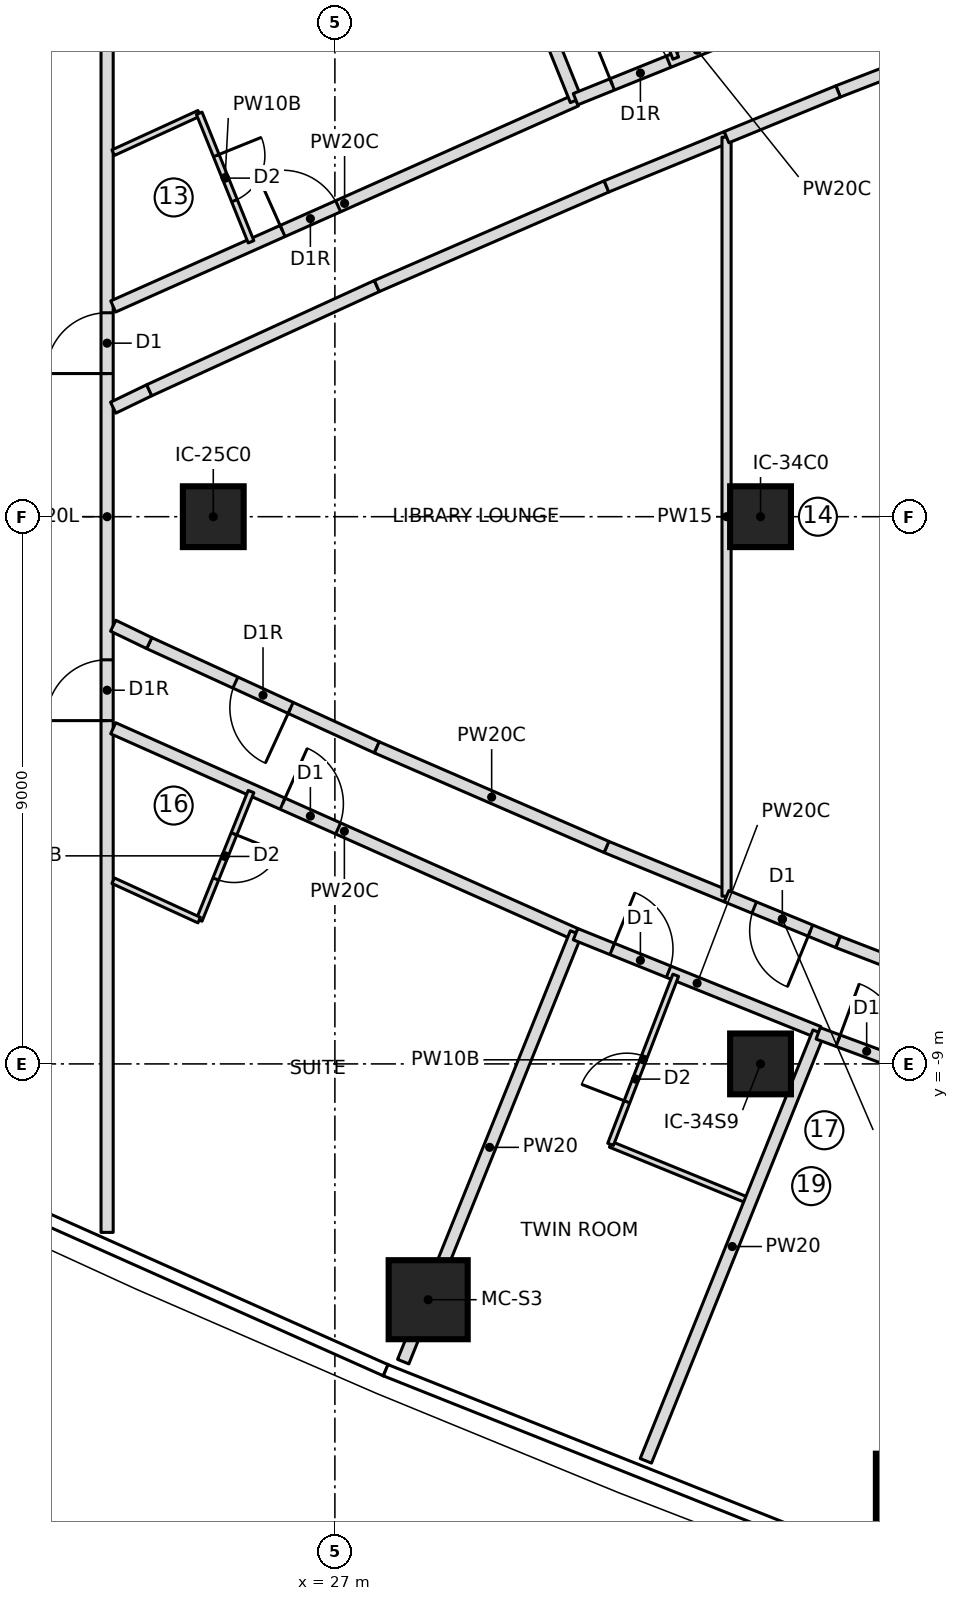
"""IFC4 building model, lengths in metres.
Left out: names, types, materials, properties, quantities, classifications, styles, units other than length and angle.
Written with IfcOpenShell. Run it as: python <this file> out.ifc"""

import sys

from ifc_helpers import new_model, si_unit, direction, frame, frame_2d, origin, origin_2d, place, context, subcontext, project, spatial, rectangle, extrude, element, fill, save


model = new_model("IFC4")
c1 = context("Model", 3, precision=1e-05, world=origin(), true_north=direction((0.0, 1.0)))
c2 = subcontext(c1, "Body", "Model", "MODEL_VIEW")
j1 = project(units=[si_unit("LENGTHUNIT", "METRE"), si_unit("PLANEANGLEUNIT", "RADIAN")], contexts=[c1])
p1 = place(None, origin())
s1 = spatial("IfcSite", under=j1, at=p1, CompositionType="ELEMENT")
p2 = place(p1, origin())
s2 = spatial("IfcBuilding", under=s1, at=p2, CompositionType="ELEMENT")
p3 = place(p2, frame((0.0, 0.0, 203.9)))
s3 = spatial("IfcBuildingStorey", under=s2, at=p3, CompositionType="ELEMENT", Elevation=203.9)
for number, where, z_axis, x_axis in (
    (1, (28.534, -12.878, 0.0), (0.0, 0.0, 1.0), (1.0, 0.0, 0.0)),
    (2, (36.547, -16.061, 0.0), (0.0, 0.0, 1.0), (1.0, 0.0, 0.0)),
):
    element("IfcColumn", number, at=place(p3, frame(where, z_axis=z_axis, x_axis=x_axis)), inside=s3, PredefinedType="COLUMN", context=c2, shape_type="SweptSolid", body=[
        extrude(rectangle(XDim=1.3, YDim=1.3, at=origin_2d()), origin(), (0.0, 0.0, 1.0), 3.55),
    ])
for number, where, z_axis, x_axis in (
    (3, (25.0, 0.0, 0.0), (0.0, 0.0, 1.0), (1.0, 0.0, 0.0)),
    (4, (34.0, -9.0, 0.0), (0.0, 0.0, 1.0), (1.0, 0.0, 0.0)),
    (5, (34.0, 0.0, 0.0), (0.0, 0.0, 1.0), (1.0, 0.0, 0.0)),
):
    element("IfcColumn", number, at=place(p3, frame(where, z_axis=z_axis, x_axis=x_axis)), inside=s3, PredefinedType="COLUMN", context=c2, shape_type="SweptSolid", body=[
        extrude(rectangle(XDim=1.0, YDim=1.0, at=origin_2d()), origin(), (0.0, 0.0, 1.0), 3.55),
    ])
p4 = place(p3, frame((23.254, -11.771, 0.0), z_axis=(0.0, 0.0, 1.0), x_axis=(0.0, 1.0, 0.0)))
e6 = element("IfcWall", 6, at=p4, inside=s3, PredefinedType="PARTITIONING", context=c2, shape_type="SweptSolid", body=[
    extrude(rectangle(XDim=23.542, YDim=0.2, at=frame_2d((11.771, 0.0))), origin(), (0.0, 0.0, 1.0), 3.25),
])
p5 = place(p4, frame((14.125, 0.0, 0.0)))
e7 = element("IfcOpeningElement", 7, at=p5, cuts=e6, PredefinedType="OPENING", context=c2, shape_type="SweptSolid", body=[
    extrude(rectangle(XDim=1.0, YDim=2.1, at=frame_2d((0.5, 1.05))), frame((0.0, 0.11, 0.0), z_axis=(0.0, -1.0, 0.0), x_axis=(1.0, 0.0, 0.0)), (0.0, 0.0, 1.0), 0.22),
])
p6 = place(p4, frame((8.417, 0.0, 0.0)))
e8 = element("IfcOpeningElement", 8, at=p6, cuts=e6, PredefinedType="OPENING", context=c2, shape_type="SweptSolid", body=[
    extrude(rectangle(XDim=1.0, YDim=2.1, at=frame_2d((0.5, 1.05))), frame((0.0, 0.11, 0.0), z_axis=(0.0, -1.0, 0.0), x_axis=(1.0, 0.0, 0.0)), (0.0, 0.0, 1.0), 0.22),
])
p7 = place(p3, frame((23.354, 3.458, 0.0), z_axis=(0.0, 0.0, 1.0), x_axis=(0.913485016927, 0.406872368009, 0.0)))
e9 = element("IfcWall", 9, at=p7, inside=s3, PredefinedType="PARTITIONING", context=c2, shape_type="SweptSolid", body=[
    extrude(rectangle(XDim=8.332, YDim=0.2, at=frame_2d((4.166, 0.0))), origin(), (0.0, 0.0, 1.0), 3.25),
])
p8 = place(p7, frame((3.05, 0.0, 0.0)))
e10 = element("IfcOpeningElement", 10, at=p8, cuts=e9, PredefinedType="OPENING", context=c2, shape_type="SweptSolid", body=[
    extrude(rectangle(XDim=1.0, YDim=2.1, at=frame_2d((0.5, 1.05))), frame((0.0, 0.11, 0.0), z_axis=(0.0, -1.0, 0.0), x_axis=(1.0, 0.0, 0.0)), (0.0, 0.0, 1.0), 0.22),
])
p9 = place(p3, frame((23.354, 5.987, 0.0), z_axis=(0.0, 0.0, 1.0), x_axis=(0.909158902999, 0.416449383597, 0.0)))
e11 = element("IfcWall", 11, at=p9, inside=s3, PredefinedType="PARTITIONING", context=c2, shape_type="SweptSolid", body=[
    extrude(rectangle(XDim=1.556, YDim=0.1, at=frame_2d((0.778, 0.0))), origin(), (0.0, 0.0, 1.0), 3.25),
])
p10 = place(p3, frame((24.769, 6.635, 0.0), z_axis=(0.0, 0.0, 1.0), x_axis=(0.373956446544, -0.927446265877, 0.0)))
e12 = element("IfcWall", 12, at=p10, inside=s3, PredefinedType="PARTITIONING", context=c2, shape_type="SweptSolid", body=[
    extrude(rectangle(XDim=2.279, YDim=0.1, at=frame_2d((1.14, 0.0))), origin(), (0.0, 0.0, 1.0), 3.25),
])
p11 = place(p10, frame((0.75, 0.0, 0.0)))
e13 = element("IfcOpeningElement", 13, at=p11, cuts=e12, PredefinedType="OPENING", context=c2, shape_type="SweptSolid", body=[
    extrude(rectangle(XDim=0.8, YDim=2.1, at=frame_2d((0.4, 1.05))), frame((0.0, 0.06, 0.0), z_axis=(0.0, -1.0, 0.0), x_axis=(1.0, 0.0, 0.0)), (0.0, 0.0, 1.0), 0.12),
])
p12 = place(p3, frame((30.965, 6.848, 0.0), z_axis=(0.0, 0.0, 1.0), x_axis=(-0.373876084216, 0.927478664796, 0.0)))
e14 = element("IfcWall", 14, at=p12, inside=s3, PredefinedType="PARTITIONING", context=c2, shape_type="SweptSolid", body=[
    extrude(rectangle(XDim=7.6, YDim=0.2, at=frame_2d((3.8, 0.0))), origin(), (0.0, 0.0, 1.0), 3.25),
])
p13 = place(p3, frame((30.958, 6.866, 0.0), z_axis=(0.0, 0.0, 1.0), x_axis=(0.927398695046, 0.374074404933, 0.0)))
e15 = element("IfcWall", 15, at=p13, inside=s3, PredefinedType="PARTITIONING", context=c2, shape_type="SweptSolid", body=[
    extrude(rectangle(XDim=4.311, YDim=0.2, at=frame_2d((2.155, 0.0))), origin(), (0.0, 0.0, 1.0), 3.25),
])
p14 = place(p13, frame((0.65, 0.0, 0.0)))
e16 = element("IfcOpeningElement", 16, at=p14, cuts=e15, PredefinedType="OPENING", context=c2, shape_type="SweptSolid", body=[
    extrude(rectangle(XDim=1.0, YDim=2.1, at=frame_2d((0.5, 1.05))), frame((0.0, 0.11, 0.0), z_axis=(0.0, -1.0, 0.0), x_axis=(1.0, 0.0, 0.0)), (0.0, 0.0, 1.0), 0.22),
])
p15 = place(p3, frame((32.605, 7.542, 0.0), z_axis=(0.0, 0.0, 1.0), x_axis=(-0.359637744424, 0.933092006603, 0.0)))
e17 = element("IfcWall", 17, at=p15, inside=s3, PredefinedType="PARTITIONING", context=c2, shape_type="SweptSolid", body=[
    extrude(rectangle(XDim=2.98, YDim=0.1, at=frame_2d((1.49, 0.0))), origin(), (0.0, 0.0, 1.0), 3.25),
])
p16 = place(p15, frame((1.45, 0.0, 0.0)))
e18 = element("IfcOpeningElement", 18, at=p16, cuts=e17, PredefinedType="OPENING", context=c2, shape_type="SweptSolid", body=[
    extrude(rectangle(XDim=0.8, YDim=2.1, at=frame_2d((0.4, 1.05))), frame((0.0, 0.06, 0.0), z_axis=(0.0, -1.0, 0.0), x_axis=(1.0, 0.0, 0.0)), (0.0, 0.0, 1.0), 0.12),
])
p17 = place(p3, frame((23.354, -3.479, 0.0), z_axis=(0.0, 0.0, 1.0), x_axis=(0.913491969365, -0.406856758461, 0.0)))
e19 = element("IfcWall", 19, at=p17, inside=s3, PredefinedType="PARTITIONING", context=c2, shape_type="SweptSolid", body=[
    extrude(rectangle(XDim=8.324, YDim=0.2, at=frame_2d((4.162, 0.0))), origin(), (0.0, 0.0, 1.0), 3.25),
])
p18 = place(p17, frame((3.05, 0.0, 0.0)))
e20 = element("IfcOpeningElement", 20, at=p18, cuts=e19, PredefinedType="OPENING", context=c2, shape_type="SweptSolid", body=[
    extrude(rectangle(XDim=1.0, YDim=2.1, at=frame_2d((0.5, 1.05))), frame((0.0, 0.11, 0.0), z_axis=(0.0, -1.0, 0.0), x_axis=(1.0, 0.0, 0.0)), (0.0, 0.0, 1.0), 0.22),
])
p19 = place(p3, frame((25.621, -4.521, 0.0), z_axis=(0.0, 0.0, 1.0), x_axis=(-0.373956446544, -0.927446265877, 0.0)))
e21 = element("IfcWall", 21, at=p19, inside=s3, PredefinedType="PARTITIONING", context=c2, shape_type="SweptSolid", body=[
    extrude(rectangle(XDim=2.279, YDim=0.1, at=frame_2d((1.14, 0.0))), origin(), (0.0, 0.0, 1.0), 3.25),
])
p20 = place(p19, frame((0.75, 0.0, 0.0)))
e22 = element("IfcOpeningElement", 22, at=p20, cuts=e21, PredefinedType="OPENING", context=c2, shape_type="SweptSolid", body=[
    extrude(rectangle(XDim=0.8, YDim=2.1, at=frame_2d((0.4, 1.05))), frame((0.0, 0.06, 0.0), z_axis=(0.0, -1.0, 0.0), x_axis=(1.0, 0.0, 0.0)), (0.0, 0.0, 1.0), 0.12),
])
p21 = place(p3, frame((24.769, -6.635, 0.0), z_axis=(0.0, 0.0, 1.0), x_axis=(-0.909158902999, 0.416449383597, 0.0)))
e23 = element("IfcWall", 23, at=p21, inside=s3, PredefinedType="PARTITIONING", context=c2, shape_type="SweptSolid", body=[
    extrude(rectangle(XDim=1.556, YDim=0.1, at=frame_2d((0.778, 0.0))), origin(), (0.0, 0.0, 1.0), 3.25),
])
p22 = place(p3, frame((28.124, -13.897, 0.0), z_axis=(0.0, 0.0, 1.0), x_axis=(0.373876084216, 0.927478664796, 0.0)))
e24 = element("IfcWall", 24, at=p22, inside=s3, PredefinedType="PARTITIONING", context=c2, shape_type="SweptSolid", body=[
    extrude(rectangle(XDim=7.6, YDim=0.2, at=frame_2d((3.8, 0.0))), origin(), (0.0, 0.0, 1.0), 3.25),
])
p23 = place(p3, frame((30.958, -6.866, 0.0), z_axis=(0.0, 0.0, 1.0), x_axis=(0.927398695046, -0.374074404933, 0.0)))
e25 = element("IfcWall", 25, at=p23, inside=s3, PredefinedType="PARTITIONING", context=c2, shape_type="SweptSolid", body=[
    extrude(rectangle(XDim=4.311, YDim=0.2, at=frame_2d((2.155, 0.0))), origin(), (0.0, 0.0, 1.0), 3.25),
])
p24 = place(p23, frame((0.65, 0.0, 0.0)))
e26 = element("IfcOpeningElement", 26, at=p24, cuts=e25, PredefinedType="OPENING", context=c2, shape_type="SweptSolid", body=[
    extrude(rectangle(XDim=1.0, YDim=2.1, at=frame_2d((0.5, 1.05))), frame((0.0, 0.11, 0.0), z_axis=(0.0, -1.0, 0.0), x_axis=(1.0, 0.0, 0.0)), (0.0, 0.0, 1.0), 0.22),
])
p25 = place(p3, frame((33.834, -11.261, 0.0), z_axis=(0.0, 0.0, 1.0), x_axis=(-0.925906573805, 0.377752586469, 0.0)))
e27 = element("IfcWall", 27, at=p25, inside=s3, PredefinedType="PARTITIONING", context=c2, shape_type="SweptSolid", body=[
    extrude(rectangle(XDim=2.484, YDim=0.1, at=frame_2d((1.242, 0.0))), origin(), (0.0, 0.0, 1.0), 3.25),
])
p26 = place(p3, frame((31.534, -10.323, 0.0), z_axis=(0.0, 0.0, 1.0), x_axis=(0.359610255373, 0.933102601127, 0.0)))
e28 = element("IfcWall", 28, at=p26, inside=s3, PredefinedType="PARTITIONING", context=c2, shape_type="SweptSolid", body=[
    extrude(rectangle(XDim=2.98, YDim=0.1, at=frame_2d((1.49, 0.0))), origin(), (0.0, 0.0, 1.0), 3.25),
])
p27 = place(p26, frame((0.75, 0.0, 0.0)))
e29 = element("IfcOpeningElement", 29, at=p27, cuts=e28, PredefinedType="OPENING", context=c2, shape_type="SweptSolid", body=[
    extrude(rectangle(XDim=0.8, YDim=2.1, at=frame_2d((0.4, 1.05))), frame((0.0, 0.06, 0.0), z_axis=(0.0, -1.0, 0.0), x_axis=(1.0, 0.0, 0.0)), (0.0, 0.0, 1.0), 0.12),
])
p28 = place(p3, frame((32.114, -15.528, 0.0), z_axis=(0.0, 0.0, 1.0), x_axis=(0.373881438439, 0.927476506436, 0.0)))
e30 = element("IfcWall", 30, at=p28, inside=s3, PredefinedType="PARTITIONING", context=c2, shape_type="SweptSolid", body=[
    extrude(rectangle(XDim=7.601, YDim=0.2, at=frame_2d((3.8, 0.0))), origin(), (0.0, 0.0, 1.0), 3.25),
])
p29 = place(p3, frame((34.948, -8.497, 0.0), z_axis=(0.0, 0.0, 1.0), x_axis=(0.937864515454, -0.347001657996, 0.0)))
e31 = element("IfcWall", 31, at=p29, inside=s3, PredefinedType="PARTITIONING", context=c2, shape_type="SweptSolid", body=[
    extrude(rectangle(XDim=8.621, YDim=0.2, at=frame_2d((4.311, 0.0))), origin(), (0.0, 0.0, 1.0), 3.25),
])
p30 = place(p29, frame((0.35, 0.0, 0.0)))
e32 = element("IfcOpeningElement", 32, at=p30, cuts=e31, PredefinedType="OPENING", context=c2, shape_type="SweptSolid", body=[
    extrude(rectangle(XDim=1.0, YDim=2.1, at=frame_2d((0.5, 1.05))), frame((0.0, 0.11, 0.0), z_axis=(0.0, -1.0, 0.0), x_axis=(1.0, 0.0, 0.0)), (0.0, 0.0, 1.0), 0.22),
])
p31 = place(p3, frame((27.69, -3.793, 0.0), z_axis=(0.0, 0.0, 1.0), x_axis=(-0.909180834404, 0.416401501382, 0.0)))
e33 = element("IfcWall", 33, at=p31, inside=s3, PredefinedType="PARTITIONING", context=c2, shape_type="SweptSolid", body=[
    extrude(rectangle(XDim=4.117, YDim=0.2, at=frame_2d((2.059, 0.0))), origin(), (0.0, 0.0, 1.0), 3.25),
])
p32 = place(p31, frame((1.559, 0.0, 0.0)))
e34 = element("IfcOpeningElement", 34, at=p32, cuts=e33, PredefinedType="OPENING", context=c2, shape_type="SweptSolid", body=[
    extrude(rectangle(XDim=1.0, YDim=2.1, at=frame_2d((0.5, 1.05))), frame((0.0, 0.11, 0.0), z_axis=(0.0, -1.0, 0.0), x_axis=(1.0, 0.0, 0.0)), (0.0, 0.0, 1.0), 0.22),
])
p33 = place(p3, frame((33.441, -6.242, 0.0), z_axis=(0.0, 0.0, 1.0), x_axis=(-0.925231428595, 0.379403220256, 0.0)))
e35 = element("IfcWall", 35, at=p33, inside=s3, PredefinedType="PARTITIONING", context=c2, shape_type="SweptSolid", body=[
    extrude(rectangle(XDim=2.135, YDim=0.2, at=frame_2d((1.067, 0.0))), origin(), (0.0, 0.0, 1.0), 3.25),
])
p34 = place(p3, frame((31.467, -5.432, 0.0), z_axis=(0.0, 0.0, 1.0), x_axis=(-0.917375244839, 0.398023441717, 0.0)))
e36 = element("IfcWall", 36, at=p34, inside=s3, PredefinedType="PARTITIONING", context=c2, shape_type="SweptSolid", body=[
    extrude(rectangle(XDim=4.117, YDim=0.2, at=frame_2d((2.059, 0.0))), origin(), (0.0, 0.0, 1.0), 3.25),
])
for number, where, z_axis, x_axis in (
    (37, (23.947, -2.079, 0.0), (0.0, 0.0, 1.0), (-0.901, 0.435, 0.0)),
    (38, (23.354, 1.793, 0.0), (0.0, 0.0, 1.0), (0.901, 0.435, 0.0)),
):
    element("IfcWall", number, at=place(p3, frame(where, z_axis=z_axis, x_axis=x_axis)), inside=s3, PredefinedType="PARTITIONING", context=c2, shape_type="SweptSolid", body=[
        extrude(rectangle(XDim=0.658, YDim=0.2, at=frame_2d((0.329, 0.0))), origin(), (0.0, 0.0, 1.0), 3.25),
    ])
p35 = place(p3, frame((23.947, 2.079, 0.0), z_axis=(0.0, 0.0, 1.0), x_axis=(0.909180834404, 0.416401501382, 0.0)))
e39 = element("IfcWall", 39, at=p35, inside=s3, PredefinedType="PARTITIONING", context=c2, shape_type="SweptSolid", body=[
    extrude(rectangle(XDim=4.117, YDim=0.2, at=frame_2d((2.059, 0.0))), origin(), (0.0, 0.0, 1.0), 3.25),
])
p36 = place(p3, frame((27.69, 3.793, 0.0), z_axis=(0.0, 0.0, 1.0), x_axis=(0.917375244839, 0.398023441717, 0.0)))
e40 = element("IfcWall", 40, at=p36, inside=s3, PredefinedType="PARTITIONING", context=c2, shape_type="SweptSolid", body=[
    extrude(rectangle(XDim=4.117, YDim=0.2, at=frame_2d((2.059, 0.0))), origin(), (0.0, 0.0, 1.0), 3.25),
])
p37 = place(p3, frame((31.467, 5.432, 0.0), z_axis=(0.0, 0.0, 1.0), x_axis=(0.925231428595, 0.379403220256, 0.0)))
e41 = element("IfcWall", 41, at=p37, inside=s3, PredefinedType="PARTITIONING", context=c2, shape_type="SweptSolid", body=[
    extrude(rectangle(XDim=2.135, YDim=0.2, at=frame_2d((1.067, 0.0))), origin(), (0.0, 0.0, 1.0), 3.25),
])
p38 = place(p3, frame((33.441, -6.242, 0.0), z_axis=(0.0, 0.0, 1.0), x_axis=(0.0, 1.0, 0.0)))
e42 = element("IfcWall", 42, at=p38, inside=s3, PredefinedType="PARTITIONING", context=c2, shape_type="SweptSolid", body=[
    extrude(rectangle(XDim=12.484, YDim=0.15, at=frame_2d((6.242, 0.0))), origin(), (0.0, 0.0, 1.0), 3.25),
])
p39 = place(p3, frame((35.276, -6.994, 0.0), z_axis=(0.0, 0.0, 1.0), x_axis=(-0.925179705777, 0.379529329589, 0.0)))
e43 = element("IfcWall", 43, at=p39, inside=s3, PredefinedType="PARTITIONING", context=c2, shape_type="SweptSolid", body=[
    extrude(rectangle(XDim=1.983, YDim=0.2, at=frame_2d((0.991, 0.0))), origin(), (0.0, 0.0, 1.0), 3.25),
])
p40 = place(p39, frame((0.491, 0.0, 0.0)))
e44 = element("IfcOpeningElement", 44, at=p40, cuts=e43, PredefinedType="OPENING", context=c2, shape_type="SweptSolid", body=[
    extrude(rectangle(XDim=1.0, YDim=2.1, at=frame_2d((0.5, 1.05))), frame((0.0, 0.11, 0.0), z_axis=(0.0, -1.0, 0.0), x_axis=(1.0, 0.0, 0.0)), (0.0, 0.0, 1.0), 0.22),
])
for number, where, z_axis, x_axis in (
    (45, (35.276, 6.994, 0.0), (0.0, 0.0, 1.0), (0.933, 0.361, 0.0)),
    (46, (36.441, -7.445, 0.0), (0.0, 0.0, 1.0), (-0.933, 0.361, 0.0)),
):
    element("IfcWall", number, at=place(p3, frame(where, z_axis=z_axis, x_axis=x_axis)), inside=s3, PredefinedType="PARTITIONING", context=c2, shape_type="SweptSolid", body=[
        extrude(rectangle(XDim=1.25, YDim=0.2, at=frame_2d((0.625, 0.0))), origin(), (0.0, 0.0, 1.0), 3.25),
    ])
p41 = place(p3, frame((33.441, 6.242, 0.0), z_axis=(0.0, 0.0, 1.0), x_axis=(0.925179705777, 0.379529329589, 0.0)))
e47 = element("IfcWall", 47, at=p41, inside=s3, PredefinedType="PARTITIONING", context=c2, shape_type="SweptSolid", body=[
    extrude(rectangle(XDim=1.983, YDim=0.2, at=frame_2d((0.991, 0.0))), origin(), (0.0, 0.0, 1.0), 3.25),
])
p42 = place(p5, origin())
e48 = element("IfcDoor", 48, at=p42, inside=s3, OperationType="SINGLE_SWING_LEFT", PredefinedType="DOOR", context=c2, shape_type="SweptSolid", body=[
    extrude(rectangle(XDim=1.0, YDim=2.1, at=frame_2d((0.5, 1.05))), frame((0.0, 0.025, 0.0), z_axis=(0.0, -1.0, 0.0), x_axis=(1.0, 0.0, 0.0)), (0.0, 0.0, 1.0), 0.05),
])
fill(e7, e48)
p43 = place(p6, origin())
e49 = element("IfcDoor", 49, at=p43, inside=s3, OperationType="SINGLE_SWING_RIGHT", PredefinedType="DOOR", context=c2, shape_type="SweptSolid", body=[
    extrude(rectangle(XDim=1.0, YDim=2.1, at=frame_2d((0.5, 1.05))), frame((0.0, 0.025, 0.0), z_axis=(0.0, -1.0, 0.0), x_axis=(1.0, 0.0, 0.0)), (0.0, 0.0, 1.0), 0.05),
])
fill(e8, e49)
p44 = place(p11, origin())
e50 = element("IfcDoor", 50, at=p44, inside=s3, OperationType="SINGLE_SWING_LEFT", PredefinedType="DOOR", context=c2, shape_type="SweptSolid", body=[
    extrude(rectangle(XDim=0.8, YDim=2.1, at=frame_2d((0.4, 1.05))), frame((0.0, 0.025, 0.0), z_axis=(0.0, -1.0, 0.0), x_axis=(1.0, 0.0, 0.0)), (0.0, 0.0, 1.0), 0.05),
])
fill(e13, e50)
p45 = place(p8, origin())
e51 = element("IfcDoor", 51, at=p45, inside=s3, OperationType="SINGLE_SWING_RIGHT", PredefinedType="DOOR", context=c2, shape_type="SweptSolid", body=[
    extrude(rectangle(XDim=1.0, YDim=2.1, at=frame_2d((0.5, 1.05))), frame((0.0, 0.025, 0.0), z_axis=(0.0, -1.0, 0.0), x_axis=(1.0, 0.0, 0.0)), (0.0, 0.0, 1.0), 0.05),
])
fill(e10, e51)
p46 = place(p14, origin())
e52 = element("IfcDoor", 52, at=p46, inside=s3, OperationType="SINGLE_SWING_RIGHT", PredefinedType="DOOR", context=c2, shape_type="SweptSolid", body=[
    extrude(rectangle(XDim=1.0, YDim=2.1, at=frame_2d((0.5, 1.05))), frame((0.0, 0.025, 0.0), z_axis=(0.0, -1.0, 0.0), x_axis=(1.0, 0.0, 0.0)), (0.0, 0.0, 1.0), 0.05),
])
fill(e16, e52)
p47 = place(p20, origin())
e53 = element("IfcDoor", 53, at=p47, inside=s3, OperationType="SINGLE_SWING_LEFT", PredefinedType="DOOR", context=c2, shape_type="SweptSolid", body=[
    extrude(rectangle(XDim=0.8, YDim=2.1, at=frame_2d((0.4, 1.05))), frame((0.0, 0.025, 0.0), z_axis=(0.0, -1.0, 0.0), x_axis=(1.0, 0.0, 0.0)), (0.0, 0.0, 1.0), 0.05),
])
fill(e22, e53)
p48 = place(p18, origin())
e54 = element("IfcDoor", 54, at=p48, inside=s3, OperationType="SINGLE_SWING_LEFT", PredefinedType="DOOR", context=c2, shape_type="SweptSolid", body=[
    extrude(rectangle(XDim=1.0, YDim=2.1, at=frame_2d((0.5, 1.05))), frame((0.0, 0.025, 0.0), z_axis=(0.0, -1.0, 0.0), x_axis=(1.0, 0.0, 0.0)), (0.0, 0.0, 1.0), 0.05),
])
fill(e20, e54)
p49 = place(p27, origin())
e55 = element("IfcDoor", 55, at=p49, inside=s3, OperationType="SINGLE_SWING_LEFT", PredefinedType="DOOR", context=c2, shape_type="SweptSolid", body=[
    extrude(rectangle(XDim=0.8, YDim=2.1, at=frame_2d((0.4, 1.05))), frame((0.0, 0.025, 0.0), z_axis=(0.0, -1.0, 0.0), x_axis=(1.0, 0.0, 0.0)), (0.0, 0.0, 1.0), 0.05),
])
fill(e29, e55)
p50 = place(p24, origin())
e56 = element("IfcDoor", 56, at=p50, inside=s3, OperationType="SINGLE_SWING_LEFT", PredefinedType="DOOR", context=c2, shape_type="SweptSolid", body=[
    extrude(rectangle(XDim=1.0, YDim=2.1, at=frame_2d((0.5, 1.05))), frame((0.0, 0.025, 0.0), z_axis=(0.0, -1.0, 0.0), x_axis=(1.0, 0.0, 0.0)), (0.0, 0.0, 1.0), 0.05),
])
fill(e26, e56)
p51 = place(p30, origin())
e57 = element("IfcDoor", 57, at=p51, inside=s3, OperationType="SINGLE_SWING_LEFT", PredefinedType="DOOR", context=c2, shape_type="SweptSolid", body=[
    extrude(rectangle(XDim=1.0, YDim=2.1, at=frame_2d((0.5, 1.05))), frame((0.0, 0.025, 0.0), z_axis=(0.0, -1.0, 0.0), x_axis=(1.0, 0.0, 0.0)), (0.0, 0.0, 1.0), 0.05),
])
fill(e32, e57)
p52 = place(p32, origin())
e58 = element("IfcDoor", 58, at=p52, inside=s3, OperationType="SINGLE_SWING_RIGHT", PredefinedType="DOOR", context=c2, shape_type="SweptSolid", body=[
    extrude(rectangle(XDim=1.0, YDim=2.1, at=frame_2d((0.5, 1.05))), frame((0.0, 0.025, 0.0), z_axis=(0.0, -1.0, 0.0), x_axis=(1.0, 0.0, 0.0)), (0.0, 0.0, 1.0), 0.05),
])
fill(e34, e58)
p53 = place(p40, origin())
e59 = element("IfcDoor", 59, at=p53, inside=s3, OperationType="SINGLE_SWING_LEFT", PredefinedType="DOOR", context=c2, shape_type="SweptSolid", body=[
    extrude(rectangle(XDim=1.0, YDim=2.1, at=frame_2d((0.5, 1.05))), frame((0.0, 0.025, 0.0), z_axis=(0.0, -1.0, 0.0), x_axis=(1.0, 0.0, 0.0)), (0.0, 0.0, 1.0), 0.05),
])
fill(e44, e59)
save(model, sys.argv[1])
